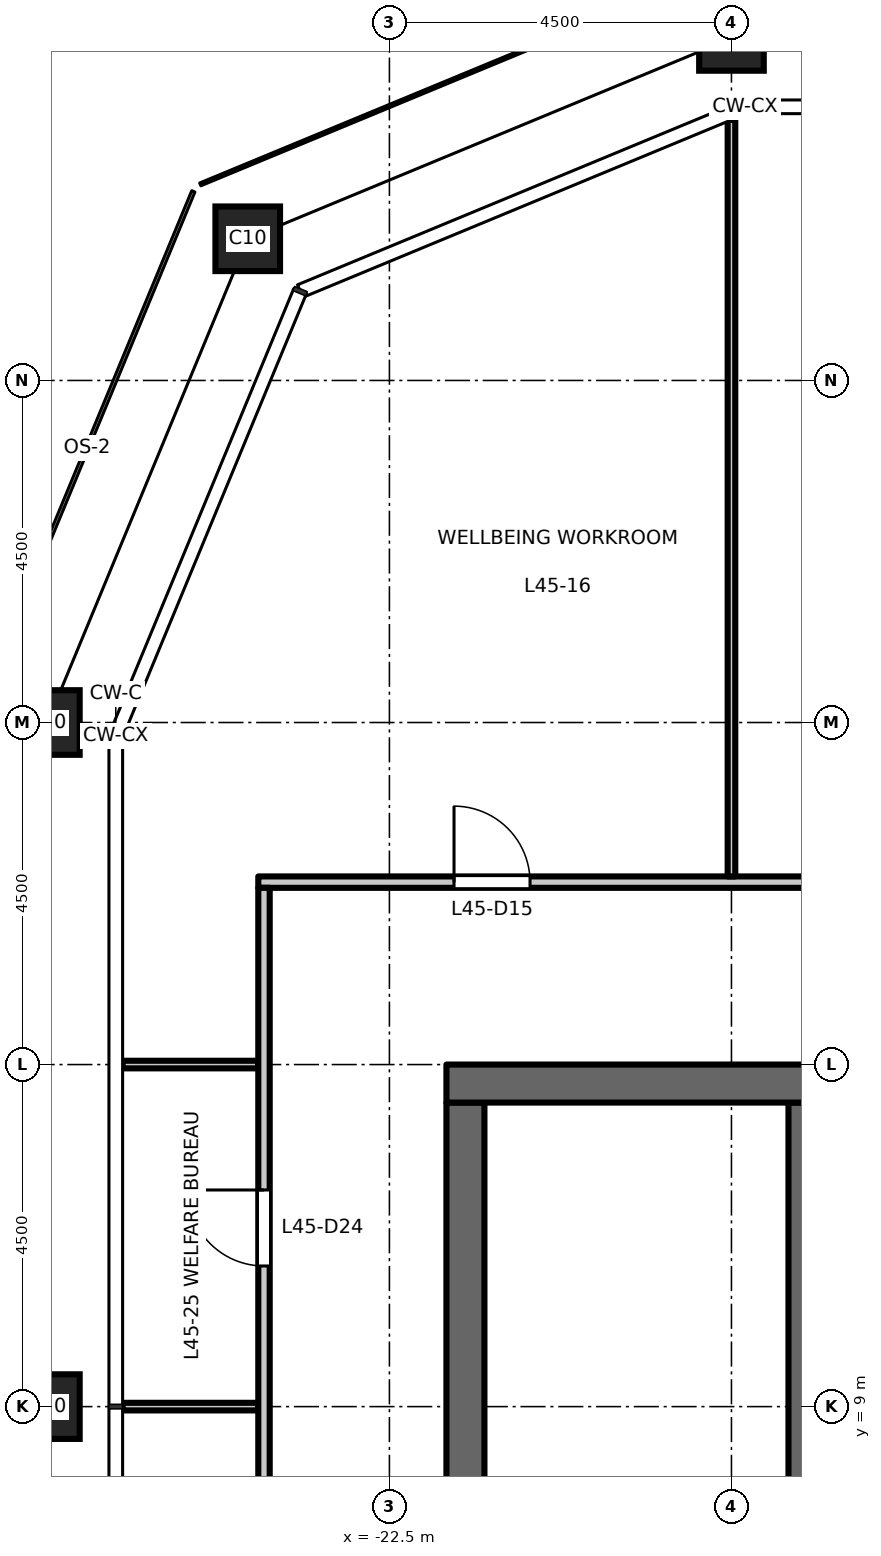
"""IFC4 building model, lengths in metres.
Left out: names, types, materials, properties, quantities, classifications, styles, units other than length and angle.
Written with IfcOpenShell. Run it as: python <this file> out.ifc"""

import sys

from ifc_helpers import new_model, si_unit, direction, frame, frame_2d, origin, origin_2d, place, context, subcontext, project, spatial, rectangle, hollow_rectangle, extrude, element, fill, save


model = new_model("IFC4")
c1 = context("Model", 3, precision=1e-05, world=origin(), true_north=direction((0.0, 1.0)))
c2 = subcontext(c1, "Body", "Model", "MODEL_VIEW")
j1 = project(units=[si_unit("LENGTHUNIT", "METRE"), si_unit("PLANEANGLEUNIT", "RADIAN")], contexts=[c1])
p1 = place(None, origin())
s1 = spatial("IfcSite", under=j1, at=p1, CompositionType="ELEMENT")
p2 = place(p1, origin())
s2 = spatial("IfcBuilding", under=s1, at=p2, CompositionType="ELEMENT")
p3 = place(p2, frame((0.0, 0.0, 210.7)))
s3 = spatial("IfcBuildingStorey", under=s2, at=p3, CompositionType="ELEMENT", Elevation=210.7)
for number, where, z_axis, x_axis in (
    (1, (-18.0, 27.0, 0.0), (0.0, 0.0, 1.0), (1.0, 0.0, 0.0)),
    (2, (-24.364, 24.364, 0.0), (0.0, 0.0, 1.0), (1.0, 0.0, 0.0)),
    (3, (-27.0, 18.0, 0.0), (0.0, 0.0, 1.0), (1.0, 0.0, 0.0)),
    (4, (-27.0, 9.0, 0.0), (0.0, 0.0, 1.0), (1.0, 0.0, 0.0)),
):
    element("IfcColumn", number, at=place(p3, frame(where, z_axis=z_axis, x_axis=x_axis)), inside=s3, PredefinedType="COLUMN", context=c2, shape_type="SweptSolid", body=[
        extrude(hollow_rectangle(XDim=0.85, YDim=0.85, WallThickness=0.05, at=origin_2d()), origin(), (0.0, 0.0, 1.0), 4.5),
    ])
p4 = place(p3, frame((-21.5, -13.0, 0.0), z_axis=(0.0, 0.0, 1.0), x_axis=(0.0, 1.0, 0.0)))
e5 = element("IfcWall", 5, at=p4, inside=s3, PredefinedType="SHEAR", context=c2, shape_type="SweptSolid", body=[
    extrude(rectangle(XDim=26.0, YDim=0.5, at=frame_2d((13.0, 0.0))), origin(), (0.0, 0.0, 1.0), 4.35),
])
p5 = place(p4, frame((16.825, 0.0, 0.0)))
e6 = element("IfcOpeningElement", 6, at=p5, cuts=e5, PredefinedType="OPENING", context=c2, shape_type="SweptSolid", body=[
    extrude(rectangle(XDim=1.8, YDim=2.1, at=frame_2d((0.9, 1.05))), frame((0.0, 0.26, 0.0), z_axis=(0.0, -1.0, 0.0), x_axis=(1.0, 0.0, 0.0)), (0.0, 0.0, 1.0), 0.52),
])
p6 = place(p4, frame((7.375, 0.0, 0.0)))
e7 = element("IfcOpeningElement", 7, at=p6, cuts=e5, PredefinedType="OPENING", context=c2, shape_type="SweptSolid", body=[
    extrude(rectangle(XDim=1.8, YDim=2.1, at=frame_2d((0.9, 1.05))), frame((0.0, 0.26, 0.0), z_axis=(0.0, -1.0, 0.0), x_axis=(1.0, 0.0, 0.0)), (0.0, 0.0, 1.0), 0.52),
])
p7 = place(p4, frame((14.125, 0.0, 0.0)))
e8 = element("IfcOpeningElement", 8, at=p7, cuts=e5, PredefinedType="OPENING", context=c2, shape_type="SweptSolid", body=[
    extrude(rectangle(XDim=0.9, YDim=2.1, at=frame_2d((0.45, 1.05))), frame((0.0, 0.26, 0.0), z_axis=(0.0, -1.0, 0.0), x_axis=(1.0, 0.0, 0.0)), (0.0, 0.0, 1.0), 0.52),
])
p8 = place(p3, frame((-17.0, 6.425, 0.0), z_axis=(0.0, 0.0, 1.0), x_axis=(0.0, 1.0, 0.0)))
e9 = element("IfcWall", 9, at=p8, inside=s3, PredefinedType="SHEAR", context=c2, shape_type="SweptSolid", body=[
    extrude(rectangle(XDim=6.575, YDim=0.5, at=frame_2d((3.288, 0.0))), origin(), (0.0, 0.0, 1.0), 4.35),
])
p9 = place(p3, frame((-8.25, 13.25, 0.0), z_axis=(0.0, 0.0, 1.0), x_axis=(-1.0, 0.0, 0.0)))
e10 = element("IfcWall", 10, at=p9, inside=s3, PredefinedType="SHEAR", context=c2, shape_type="SweptSolid", body=[
    extrude(rectangle(XDim=13.5, YDim=0.5, at=frame_2d((6.75, 0.0))), origin(), (0.0, 0.0, 1.0), 4.35),
])
for number, where, z_axis, x_axis in (
    (11, (-26.01, 9.0, 0.0), (0.0, 0.0, 1.0), (1.0, 0.0, 0.0)),
    (12, (-26.01, 13.5, 0.0), (0.0, 0.0, 1.0), (1.0, 0.0, 0.0)),
):
    element("IfcWall", number, at=place(p3, frame(where, z_axis=z_axis, x_axis=x_axis)), inside=s3, PredefinedType="PARTITIONING", context=c2, shape_type="SweptSolid", body=[
        extrude(rectangle(XDim=1.785, YDim=0.1, at=frame_2d((0.893, 0.0))), origin(), (0.0, 0.0, 1.0), 4.35),
    ])
p10 = place(p3, frame((-24.225, 15.9, 0.0), z_axis=(0.0, 0.0, 1.0), x_axis=(1.0, 0.0, 0.0)))
e13 = element("IfcWall", 13, at=p10, inside=s3, PredefinedType="PARTITIONING", context=c2, shape_type="SweptSolid", body=[
    extrude(rectangle(XDim=48.45, YDim=0.15, at=frame_2d((24.225, 0.0))), origin(), (0.0, 0.0, 1.0), 4.35),
])
p11 = place(p10, frame((10.325, 0.0, 0.0)))
e14 = element("IfcOpeningElement", 14, at=p11, cuts=e13, PredefinedType="OPENING", context=c2, shape_type="SweptSolid", body=[
    extrude(rectangle(XDim=1.0, YDim=2.1, at=frame_2d((0.5, 1.05))), frame((0.0, 0.085, 0.0), z_axis=(0.0, -1.0, 0.0), x_axis=(1.0, 0.0, 0.0)), (0.0, 0.0, 1.0), 0.17),
])
p12 = place(p10, frame((19.325, 0.0, 0.0)))
e15 = element("IfcOpeningElement", 15, at=p12, cuts=e13, PredefinedType="OPENING", context=c2, shape_type="SweptSolid", body=[
    extrude(rectangle(XDim=1.0, YDim=2.1, at=frame_2d((0.5, 1.05))), frame((0.0, 0.085, 0.0), z_axis=(0.0, -1.0, 0.0), x_axis=(1.0, 0.0, 0.0)), (0.0, 0.0, 1.0), 0.17),
])
p13 = place(p10, frame((28.325, 0.0, 0.0)))
e16 = element("IfcOpeningElement", 16, at=p13, cuts=e13, PredefinedType="OPENING", context=c2, shape_type="SweptSolid", body=[
    extrude(rectangle(XDim=1.0, YDim=2.1, at=frame_2d((0.5, 1.05))), frame((0.0, 0.085, 0.0), z_axis=(0.0, -1.0, 0.0), x_axis=(1.0, 0.0, 0.0)), (0.0, 0.0, 1.0), 0.17),
])
p14 = place(p10, frame((37.325, 0.0, 0.0)))
e17 = element("IfcOpeningElement", 17, at=p14, cuts=e13, PredefinedType="OPENING", context=c2, shape_type="SweptSolid", body=[
    extrude(rectangle(XDim=1.0, YDim=2.1, at=frame_2d((0.5, 1.05))), frame((0.0, 0.085, 0.0), z_axis=(0.0, -1.0, 0.0), x_axis=(1.0, 0.0, 0.0)), (0.0, 0.0, 1.0), 0.17),
])
p15 = place(p10, frame((2.575, 0.0, 0.0)))
e18 = element("IfcOpeningElement", 18, at=p15, cuts=e13, PredefinedType="OPENING", context=c2, shape_type="SweptSolid", body=[
    extrude(rectangle(XDim=1.0, YDim=2.1, at=frame_2d((0.5, 1.05))), frame((0.0, 0.085, 0.0), z_axis=(0.0, -1.0, 0.0), x_axis=(1.0, 0.0, 0.0)), (0.0, 0.0, 1.0), 0.17),
])
p16 = place(p3, frame((-24.15, -15.825, 0.0), z_axis=(0.0, 0.0, 1.0), x_axis=(0.0, 1.0, 0.0)))
e19 = element("IfcWall", 19, at=p16, inside=s3, PredefinedType="PARTITIONING", context=c2, shape_type="SweptSolid", body=[
    extrude(rectangle(XDim=31.65, YDim=0.15, at=frame_2d((15.825, 0.0))), origin(), (0.0, 0.0, 1.0), 4.35),
])
p17 = place(p16, frame((0.675, 0.0, 0.0)))
e20 = element("IfcOpeningElement", 20, at=p17, cuts=e19, PredefinedType="OPENING", context=c2, shape_type="SweptSolid", body=[
    extrude(rectangle(XDim=1.0, YDim=2.1, at=frame_2d((0.5, 1.05))), frame((0.0, 0.085, 0.0), z_axis=(0.0, -1.0, 0.0), x_axis=(1.0, 0.0, 0.0)), (0.0, 0.0, 1.0), 0.17),
])
p18 = place(p16, frame((4.175, 0.0, 0.0)))
e21 = element("IfcOpeningElement", 21, at=p18, cuts=e19, PredefinedType="OPENING", context=c2, shape_type="SweptSolid", body=[
    extrude(rectangle(XDim=1.0, YDim=2.1, at=frame_2d((0.5, 1.05))), frame((0.0, 0.085, 0.0), z_axis=(0.0, -1.0, 0.0), x_axis=(1.0, 0.0, 0.0)), (0.0, 0.0, 1.0), 0.17),
])
p19 = place(p16, frame((10.925, 0.0, 0.0)))
e22 = element("IfcOpeningElement", 22, at=p19, cuts=e19, PredefinedType="OPENING", context=c2, shape_type="SweptSolid", body=[
    extrude(rectangle(XDim=1.0, YDim=2.1, at=frame_2d((0.5, 1.05))), frame((0.0, 0.085, 0.0), z_axis=(0.0, -1.0, 0.0), x_axis=(1.0, 0.0, 0.0)), (0.0, 0.0, 1.0), 0.17),
])
p20 = place(p16, frame((19.925, 0.0, 0.0)))
e23 = element("IfcOpeningElement", 23, at=p20, cuts=e19, PredefinedType="OPENING", context=c2, shape_type="SweptSolid", body=[
    extrude(rectangle(XDim=1.0, YDim=2.1, at=frame_2d((0.5, 1.05))), frame((0.0, 0.085, 0.0), z_axis=(0.0, -1.0, 0.0), x_axis=(1.0, 0.0, 0.0)), (0.0, 0.0, 1.0), 0.17),
])
p21 = place(p16, frame((26.675, 0.0, 0.0)))
e24 = element("IfcOpeningElement", 24, at=p21, cuts=e19, PredefinedType="OPENING", context=c2, shape_type="SweptSolid", body=[
    extrude(rectangle(XDim=1.0, YDim=2.1, at=frame_2d((0.5, 1.05))), frame((0.0, 0.085, 0.0), z_axis=(0.0, -1.0, 0.0), x_axis=(1.0, 0.0, 0.0)), (0.0, 0.0, 1.0), 0.17),
])
p22 = place(p3, frame((-18.0, 15.975, 0.0), z_axis=(0.0, 0.0, 1.0), x_axis=(0.0, 1.0, 0.0)))
e25 = element("IfcWall", 25, at=p22, inside=s3, PredefinedType="PARTITIONING", context=c2, shape_type="SweptSolid", body=[
    extrude(rectangle(XDim=9.953, YDim=0.1, at=frame_2d((4.977, 0.0))), origin(), (0.0, 0.0, 1.0), 3.65),
])
p23 = place(p15, origin())
e26 = element("IfcDoor", 26, at=p23, inside=s3, OperationType="SINGLE_SWING_LEFT", PredefinedType="DOOR", context=c2, shape_type="SweptSolid", body=[
    extrude(rectangle(XDim=1.0, YDim=2.1, at=frame_2d((0.5, 1.05))), frame((0.0, 0.025, 0.0), z_axis=(0.0, -1.0, 0.0), x_axis=(1.0, 0.0, 0.0)), (0.0, 0.0, 1.0), 0.05),
])
fill(e18, e26)
p24 = place(p21, origin())
e27 = element("IfcDoor", 27, at=p24, inside=s3, OperationType="SINGLE_SWING_RIGHT", PredefinedType="DOOR", context=c2, shape_type="SweptSolid", body=[
    extrude(rectangle(XDim=1.0, YDim=2.1, at=frame_2d((0.5, 1.05))), frame((0.0, 0.025, 0.0), z_axis=(0.0, -1.0, 0.0), x_axis=(1.0, 0.0, 0.0)), (0.0, 0.0, 1.0), 0.05),
])
fill(e24, e27)
save(model, sys.argv[1])
